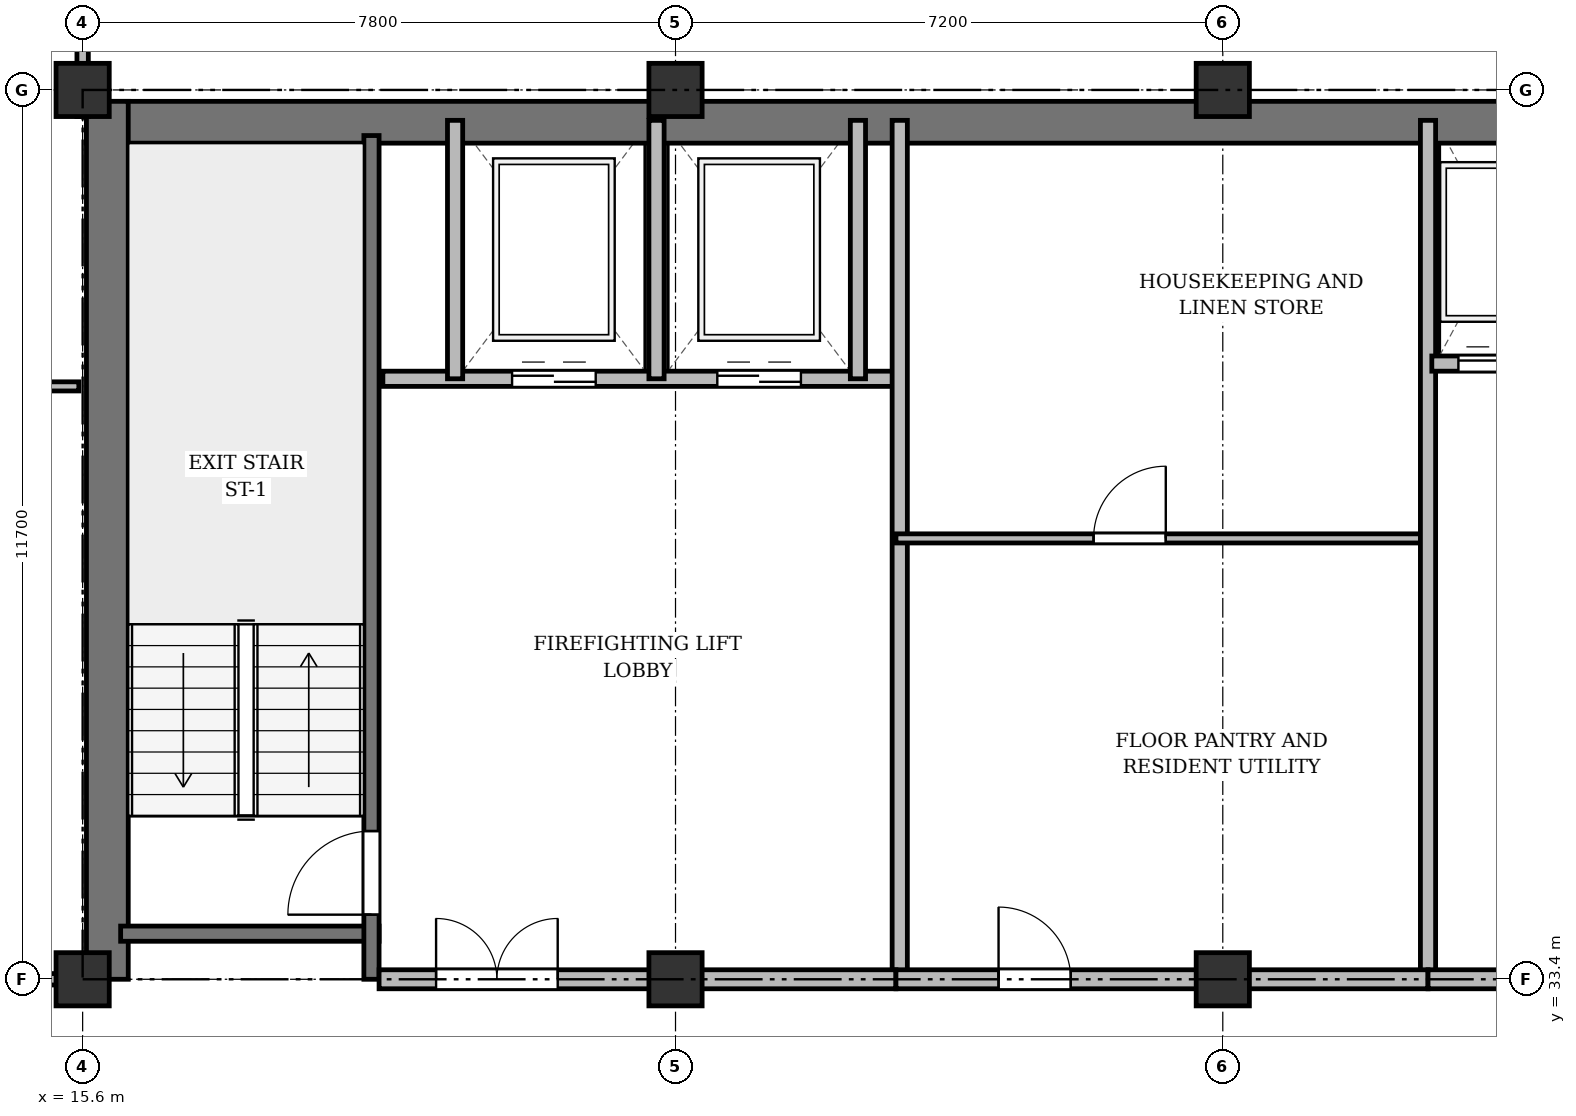
"""IFC4 building model, lengths in metres.
Left out: names, types, materials, properties, quantities, classifications, styles, units other than length and angle.
Written with IfcOpenShell. Run it as: python <this file> out.ifc"""

import sys

from ifc_helpers import new_model, si_unit, direction, frame, frame_2d, origin, origin_2d, place, context, subcontext, project, spatial, rectangle, extrude, source, transform, mapped, element, fill, save


model = new_model("IFC4")
c1 = context("Model", 3, precision=1e-05, world=origin(), true_north=direction((0.0, 1.0)))
c2 = subcontext(c1, "Body", "Model", "MODEL_VIEW")
j1 = project(units=[si_unit("LENGTHUNIT", "METRE"), si_unit("PLANEANGLEUNIT", "RADIAN")], contexts=[c1])
p1 = place(None, origin())
s1 = spatial("IfcSite", under=j1, at=p1, CompositionType="ELEMENT")
p2 = place(p1, origin())
s2 = spatial("IfcBuilding", under=s1, at=p2, CompositionType="ELEMENT")
p3 = place(p2, frame((0.0, 0.0, 215.7)))
s3 = spatial("IfcBuildingStorey", under=s2, at=p3, CompositionType="ELEMENT", Elevation=215.7)
m1 = source(origin(), c2, "Body", "SweptSolid", [
    extrude(rectangle(XDim=0.7, YDim=0.7, at=origin_2d()), origin(), (0.0, 0.0, 1.0), 3.6),
])
for number, where, z_axis, x_axis in (
    (1, (15.6, 33.4, 0.0), (0.0, 0.0, 1.0), (1.0, 0.0, 0.0)),
    (2, (15.6, 45.1, 0.0), (0.0, 0.0, 1.0), (1.0, 0.0, 0.0)),
    (3, (23.4, 33.4, 0.0), (0.0, 0.0, 1.0), (1.0, 0.0, 0.0)),
    (4, (23.4, 45.1, 0.0), (0.0, 0.0, 1.0), (1.0, 0.0, 0.0)),
    (5, (30.6, 33.4, 0.0), (0.0, 0.0, 1.0), (1.0, 0.0, 0.0)),
    (6, (30.6, 45.1, 0.0), (0.0, 0.0, 1.0), (1.0, 0.0, 0.0)),
):
    element("IfcColumn", number, at=place(p3, frame(where, z_axis=z_axis, x_axis=x_axis)), inside=s3, PredefinedType="COLUMN", context=c2, shape_type="MappedRepresentation", body=[
        mapped(m1, transform((0.0, 0.0, 0.0), x_axis=(1.0, 0.0, 0.0), y_axis=(0.0, 1.0, 0.0), z_axis=(0.0, 0.0, 1.0), scale=1.0)),
    ])
p4 = place(p3, frame((15.65, 44.675, 0.0), z_axis=(0.0, 0.0, 1.0), x_axis=(1.0, 0.0, 0.0)))
e7 = element("IfcWall", 7, at=p4, inside=s3, PredefinedType="SHEAR", context=c2, shape_type="SweptSolid", body=[
    extrude(rectangle(XDim=43.1, YDim=0.55, at=frame_2d((21.55, 0.0))), origin(), (0.0, 0.0, 1.0), 3.36),
])
p5 = place(p3, frame((15.925, 33.4, 0.0), z_axis=(0.0, 0.0, 1.0), x_axis=(0.0, 1.0, 0.0)))
e8 = element("IfcWall", 8, at=p5, inside=s3, PredefinedType="SHEAR", context=c2, shape_type="SweptSolid", body=[
    extrude(rectangle(XDim=11.55, YDim=0.55, at=frame_2d((5.775, 0.0))), origin(), (0.0, 0.0, 1.0), 3.36),
])
p6 = place(p3, frame((16.1, 34.0, 0.0), z_axis=(0.0, 0.0, 1.0), x_axis=(1.0, 0.0, 0.0)))
e9 = element("IfcWall", 9, at=p6, inside=s3, PredefinedType="SHEAR", context=c2, shape_type="SweptSolid", body=[
    extrude(rectangle(XDim=3.4, YDim=0.2, at=frame_2d((1.7, 0.0))), origin(), (0.0, 0.0, 1.0), 3.36),
])
p7 = place(p3, frame((19.4, 33.4, 0.0), z_axis=(0.0, 0.0, 1.0), x_axis=(0.0, 1.0, 0.0)))
e10 = element("IfcWall", 10, at=p7, inside=s3, PredefinedType="SHEAR", context=c2, shape_type="SweptSolid", body=[
    extrude(rectangle(XDim=11.1, YDim=0.2, at=frame_2d((5.55, 0.0))), origin(), (0.0, 0.0, 1.0), 3.36),
])
p8 = place(p7, frame((0.85, 0.0, 0.0)))
e11 = element("IfcOpeningElement", 11, at=p8, cuts=e10, PredefinedType="OPENING", context=c2, shape_type="SweptSolid", body=[
    extrude(rectangle(XDim=1.1, YDim=2.15, at=frame_2d((0.55, 1.075))), frame((0.0, 0.11, 0.0), z_axis=(0.0, -1.0, 0.0), x_axis=(1.0, 0.0, 0.0)), (0.0, 0.0, 1.0), 0.22),
])
p9 = place(p3, frame((19.55, 41.3, 0.0), z_axis=(0.0, 0.0, 1.0), x_axis=(1.0, 0.0, 0.0)))
e12 = element("IfcWall", 12, at=p9, inside=s3, PredefinedType="SOLIDWALL", context=c2, shape_type="SweptSolid", body=[
    extrude(rectangle(XDim=6.75, YDim=0.2, at=frame_2d((3.375, 0.0))), origin(), (0.0, 0.0, 1.0), 3.36),
])
p10 = place(p9, frame((1.7, 0.0, 0.0)))
e13 = element("IfcOpeningElement", 13, at=p10, cuts=e12, PredefinedType="OPENING", context=c2, shape_type="SweptSolid", body=[
    extrude(rectangle(XDim=1.1, YDim=2.15, at=frame_2d((0.55, 1.075))), frame((0.0, 0.11, 0.0), z_axis=(0.0, -1.0, 0.0), x_axis=(1.0, 0.0, 0.0)), (0.0, 0.0, 1.0), 0.22),
])
p11 = place(p9, frame((4.4, 0.0, 0.0)))
e14 = element("IfcOpeningElement", 14, at=p11, cuts=e12, PredefinedType="OPENING", context=c2, shape_type="SweptSolid", body=[
    extrude(rectangle(XDim=1.1, YDim=2.15, at=frame_2d((0.55, 1.075))), frame((0.0, 0.11, 0.0), z_axis=(0.0, -1.0, 0.0), x_axis=(1.0, 0.0, 0.0)), (0.0, 0.0, 1.0), 0.22),
])
for number, where, z_axis, x_axis in (
    (15, (20.5, 41.3, 0.0), (0.0, 0.0, 1.0), (0.0, 1.0, 0.0)),
    (16, (23.15, 41.3, 0.0), (0.0, 0.0, 1.0), (0.0, 1.0, 0.0)),
    (17, (25.8, 41.3, 0.0), (0.0, 0.0, 1.0), (0.0, 1.0, 0.0)),
):
    element("IfcWall", number, at=place(p3, frame(where, z_axis=z_axis, x_axis=x_axis)), inside=s3, PredefinedType="SOLIDWALL", context=c2, shape_type="SweptSolid", body=[
        extrude(rectangle(XDim=3.4, YDim=0.2, at=frame_2d((1.7, 0.0))), origin(), (0.0, 0.0, 1.0), 3.36),
    ])
p12 = place(p3, frame((26.35, 33.4, 0.0), z_axis=(0.0, 0.0, 1.0), x_axis=(0.0, 1.0, 0.0)))
e18 = element("IfcWall", 18, at=p12, inside=s3, PredefinedType="SOLIDWALL", context=c2, shape_type="SweptSolid", body=[
    extrude(rectangle(XDim=11.3, YDim=0.2, at=frame_2d((5.65, 0.0))), origin(), (0.0, 0.0, 1.0), 2.91),
])
p13 = place(p3, frame((19.5, 33.4, 0.0), z_axis=(0.0, 0.0, 1.0), x_axis=(1.0, 0.0, 0.0)))
e19 = element("IfcWall", 19, at=p13, inside=s3, PredefinedType="PARTITIONING", context=c2, shape_type="SweptSolid", body=[
    extrude(rectangle(XDim=6.8, YDim=0.25, at=frame_2d((3.4, 0.0))), origin(), (0.0, 0.0, 1.0), 2.91),
])
p14 = place(p13, frame((0.75, 0.0, 0.0)))
e20 = element("IfcOpeningElement", 20, at=p14, cuts=e19, PredefinedType="OPENING", context=c2, shape_type="SweptSolid", body=[
    extrude(rectangle(XDim=1.6, YDim=2.2, at=frame_2d((0.8, 1.1))), frame((0.0, 0.135, 0.0), z_axis=(0.0, -1.0, 0.0), x_axis=(1.0, 0.0, 0.0)), (0.0, 0.0, 1.0), 0.27),
])
p15 = place(p3, frame((26.3, 39.2, 0.0), z_axis=(0.0, 0.0, 1.0), x_axis=(1.0, 0.0, 0.0)))
e21 = element("IfcWall", 21, at=p15, inside=s3, PredefinedType="PARTITIONING", context=c2, shape_type="SweptSolid", body=[
    extrude(rectangle(XDim=7.0, YDim=0.12, at=frame_2d((3.5, 0.0))), origin(), (0.0, 0.0, 1.0), 2.86),
])
p16 = place(p15, frame((2.6, 0.0, 0.0)))
e22 = element("IfcOpeningElement", 22, at=p16, cuts=e21, PredefinedType="OPENING", context=c2, shape_type="SweptSolid", body=[
    extrude(rectangle(XDim=0.95, YDim=2.15, at=frame_2d((0.475, 1.075))), frame((0.0, 0.07, 0.0), z_axis=(0.0, -1.0, 0.0), x_axis=(1.0, 0.0, 0.0)), (0.0, 0.0, 1.0), 0.14),
])
p17 = place(p3, frame((33.3, 33.4, 0.0), z_axis=(0.0, 0.0, 1.0), x_axis=(0.0, 1.0, 0.0)))
e23 = element("IfcWall", 23, at=p17, inside=s3, PredefinedType="SOLIDWALL", context=c2, shape_type="SweptSolid", body=[
    extrude(rectangle(XDim=11.3, YDim=0.2, at=frame_2d((5.65, 0.0))), origin(), (0.0, 0.0, 1.0), 2.91),
])
p18 = place(p3, frame((33.35, 41.5, 0.0), z_axis=(0.0, 0.0, 1.0), x_axis=(1.0, 0.0, 0.0)))
e24 = element("IfcWall", 24, at=p18, inside=s3, PredefinedType="SOLIDWALL", context=c2, shape_type="SweptSolid", body=[
    extrude(rectangle(XDim=6.9, YDim=0.2, at=frame_2d((3.45, 0.0))), origin(), (0.0, 0.0, 1.0), 3.36),
])
p19 = place(p18, frame((0.35, 0.0, 0.0)))
e25 = element("IfcOpeningElement", 25, at=p19, cuts=e24, PredefinedType="OPENING", context=c2, shape_type="SweptSolid", body=[
    extrude(rectangle(XDim=1.05, YDim=2.15, at=frame_2d((0.525, 1.075))), frame((0.0, 0.11, 0.0), z_axis=(0.0, -1.0, 0.0), x_axis=(1.0, 0.0, 0.0)), (0.0, 0.0, 1.0), 0.22),
])
p20 = place(p18, frame((2.05, 0.0, 0.0)))
e26 = element("IfcOpeningElement", 26, at=p20, cuts=e24, PredefinedType="OPENING", context=c2, shape_type="SweptSolid", body=[
    extrude(rectangle(XDim=1.05, YDim=2.15, at=frame_2d((0.525, 1.075))), frame((0.0, 0.11, 0.0), z_axis=(0.0, -1.0, 0.0), x_axis=(1.0, 0.0, 0.0)), (0.0, 0.0, 1.0), 0.22),
])
p21 = place(p18, frame((3.75, 0.0, 0.0)))
e27 = element("IfcOpeningElement", 27, at=p21, cuts=e24, PredefinedType="OPENING", context=c2, shape_type="SweptSolid", body=[
    extrude(rectangle(XDim=1.05, YDim=2.15, at=frame_2d((0.525, 1.075))), frame((0.0, 0.11, 0.0), z_axis=(0.0, -1.0, 0.0), x_axis=(1.0, 0.0, 0.0)), (0.0, 0.0, 1.0), 0.22),
])
p22 = place(p18, frame((5.45, 0.0, 0.0)))
e28 = element("IfcOpeningElement", 28, at=p22, cuts=e24, PredefinedType="OPENING", context=c2, shape_type="SweptSolid", body=[
    extrude(rectangle(XDim=1.05, YDim=2.15, at=frame_2d((0.525, 1.075))), frame((0.0, 0.11, 0.0), z_axis=(0.0, -1.0, 0.0), x_axis=(1.0, 0.0, 0.0)), (0.0, 0.0, 1.0), 0.22),
])
p23 = place(p3, frame((26.3, 33.4, 0.0), z_axis=(0.0, 0.0, 1.0), x_axis=(1.0, 0.0, 0.0)))
e29 = element("IfcWall", 29, at=p23, inside=s3, PredefinedType="PARTITIONING", context=c2, shape_type="SweptSolid", body=[
    extrude(rectangle(XDim=7.0, YDim=0.25, at=frame_2d((3.5, 0.0))), origin(), (0.0, 0.0, 1.0), 2.91),
])
p24 = place(p23, frame((1.35, 0.0, 0.0)))
e30 = element("IfcOpeningElement", 30, at=p24, cuts=e29, PredefinedType="OPENING", context=c2, shape_type="SweptSolid", body=[
    extrude(rectangle(XDim=0.95, YDim=2.15, at=frame_2d((0.475, 1.075))), frame((0.0, 0.135, 0.0), z_axis=(0.0, -1.0, 0.0), x_axis=(1.0, 0.0, 0.0)), (0.0, 0.0, 1.0), 0.27),
])
p25 = place(p3, frame((33.3, 33.4, 0.0), z_axis=(0.0, 0.0, 1.0), x_axis=(1.0, 0.0, 0.0)))
e31 = element("IfcWall", 31, at=p25, inside=s3, PredefinedType="PARTITIONING", context=c2, shape_type="SweptSolid", body=[
    extrude(rectangle(XDim=13.85, YDim=0.25, at=frame_2d((6.925, 0.0))), origin(), (0.0, 0.0, 1.0), 2.91),
])
p26 = place(p25, frame((4.2, 0.0, 0.0)))
e32 = element("IfcOpeningElement", 32, at=p26, cuts=e31, PredefinedType="OPENING", context=c2, shape_type="SweptSolid", body=[
    extrude(rectangle(XDim=1.6, YDim=2.2, at=frame_2d((0.8, 1.1))), frame((0.0, 0.135, 0.0), z_axis=(0.0, -1.0, 0.0), x_axis=(1.0, 0.0, 0.0)), (0.0, 0.0, 1.0), 0.27),
])
p27 = place(p3, frame((8.3, 41.2, 0.0), z_axis=(0.0, 0.0, 1.0), x_axis=(1.0, 0.0, 0.0)))
e33 = element("IfcWall", 33, at=p27, inside=s3, PredefinedType="PARTITIONING", context=c2, shape_type="SweptSolid", body=[
    extrude(rectangle(XDim=7.25, YDim=0.12, at=frame_2d((3.625, 0.0))), origin(), (0.0, 0.0, 1.0), 2.86),
])
p28 = place(p27, frame((3.15, 0.0, 0.0)))
e34 = element("IfcOpeningElement", 34, at=p28, cuts=e33, PredefinedType="OPENING", context=c2, shape_type="SweptSolid", body=[
    extrude(rectangle(XDim=0.95, YDim=2.15, at=frame_2d((0.475, 1.075))), frame((0.0, 0.07, 0.0), z_axis=(0.0, -1.0, 0.0), x_axis=(1.0, 0.0, 0.0)), (0.0, 0.0, 1.0), 0.14),
])
p29 = place(p3, frame((8.25, 33.4, 0.0), z_axis=(0.0, 0.0, 1.0), x_axis=(1.0, 0.0, 0.0)))
e35 = element("IfcWall", 35, at=p29, inside=s3, PredefinedType="PARTITIONING", context=c2, shape_type="SweptSolid", body=[
    extrude(rectangle(XDim=7.35, YDim=0.15, at=frame_2d((3.675, 0.0))), origin(), (0.0, 0.0, 1.0), 2.91),
])
p30 = place(p29, frame((3.192, 0.0, 0.0)))
e36 = element("IfcOpeningElement", 36, at=p30, cuts=e35, PredefinedType="OPENING", context=c2, shape_type="SweptSolid", body=[
    extrude(rectangle(XDim=0.95, YDim=2.15, at=frame_2d((0.475, 1.075))), frame((0.0, 0.085, 0.0), z_axis=(0.0, -1.0, 0.0), x_axis=(1.0, 0.0, 0.0)), (0.0, 0.0, 1.0), 0.17),
])
p31 = place(p3, frame((15.6, 44.75, 0.0), z_axis=(0.0, 0.0, 1.0), x_axis=(0.0, 1.0, 0.0)))
e37 = element("IfcWall", 37, at=p31, inside=s3, PredefinedType="PARTITIONING", context=c2, shape_type="SweptSolid", body=[
    extrude(rectangle(XDim=3.61, YDim=0.15, at=frame_2d((1.805, 0.0))), origin(), (0.0, 0.0, 1.0), 2.86),
])
p32 = place(p31, frame((1.1, 0.0, 0.0)))
e38 = element("IfcOpeningElement", 38, at=p32, cuts=e37, PredefinedType="OPENING", context=c2, shape_type="SweptSolid", body=[
    extrude(rectangle(XDim=0.95, YDim=2.15, at=frame_2d((0.475, 1.075))), frame((0.0, 0.085, 0.0), z_axis=(0.0, -1.0, 0.0), x_axis=(1.0, 0.0, 0.0)), (0.0, 0.0, 1.0), 0.17),
])
m2 = source(origin(), c2, "Body", "SweptSolid", [
    extrude(rectangle(XDim=1.1, YDim=2.15, at=frame_2d((0.55, 1.075))), frame((0.0, 0.025, 0.0), z_axis=(0.0, -1.0, 0.0), x_axis=(1.0, 0.0, 0.0)), (0.0, 0.0, 1.0), 0.05),
])
p33 = place(p8, origin())
e39 = element("IfcDoor", 39, at=p33, inside=s3, OperationType="SINGLE_SWING_LEFT", PredefinedType="DOOR", context=c2, shape_type="MappedRepresentation", body=[
    mapped(m2, transform((0.0, 0.0, 0.0), x_axis=(1.0, 0.0, 0.0), y_axis=(0.0, 1.0, 0.0), z_axis=(0.0, 0.0, 1.0), scale=1.0)),
])
fill(e11, e39)
p34 = place(p10, origin())
e40 = element("IfcDoor", 40, at=p34, inside=s3, OperationType="DOUBLE_DOOR_SLIDING", PredefinedType="DOOR", context=c2, shape_type="MappedRepresentation", body=[
    mapped(m2, transform((0.0, 0.0, 0.0), x_axis=(1.0, 0.0, 0.0), y_axis=(0.0, 1.0, 0.0), z_axis=(0.0, 0.0, 1.0), scale=1.0)),
])
fill(e13, e40)
p35 = place(p11, origin())
e41 = element("IfcDoor", 41, at=p35, inside=s3, OperationType="DOUBLE_DOOR_SLIDING", PredefinedType="DOOR", context=c2, shape_type="MappedRepresentation", body=[
    mapped(m2, transform((0.0, 0.0, 0.0), x_axis=(1.0, 0.0, 0.0), y_axis=(0.0, 1.0, 0.0), z_axis=(0.0, 0.0, 1.0), scale=1.0)),
])
fill(e14, e41)
m3 = source(origin(), c2, "Body", "SweptSolid", [
    extrude(rectangle(XDim=1.6, YDim=2.2, at=frame_2d((0.8, 1.1))), frame((0.0, 0.025, 0.0), z_axis=(0.0, -1.0, 0.0), x_axis=(1.0, 0.0, 0.0)), (0.0, 0.0, 1.0), 0.05),
])
p36 = place(p14, origin())
e42 = element("IfcDoor", 42, at=p36, inside=s3, OperationType="DOUBLE_DOOR_SINGLE_SWING", PredefinedType="DOOR", context=c2, shape_type="MappedRepresentation", body=[
    mapped(m3, transform((0.0, 0.0, 0.0), x_axis=(1.0, 0.0, 0.0), y_axis=(0.0, 1.0, 0.0), z_axis=(0.0, 0.0, 1.0), scale=1.0)),
])
fill(e20, e42)
m4 = source(origin(), c2, "Body", "SweptSolid", [
    extrude(rectangle(XDim=0.95, YDim=2.15, at=frame_2d((0.475, 1.075))), frame((0.0, 0.025, 0.0), z_axis=(0.0, -1.0, 0.0), x_axis=(1.0, 0.0, 0.0)), (0.0, 0.0, 1.0), 0.05),
])
p37 = place(p16, origin())
e43 = element("IfcDoor", 43, at=p37, inside=s3, OperationType="SINGLE_SWING_RIGHT", PredefinedType="DOOR", context=c2, shape_type="MappedRepresentation", body=[
    mapped(m4, transform((0.0, 0.0, 0.0), x_axis=(1.0, 0.0, 0.0), y_axis=(0.0, 1.0, 0.0), z_axis=(0.0, 0.0, 1.0), scale=1.0)),
])
fill(e22, e43)
m5 = source(origin(), c2, "Body", "SweptSolid", [
    extrude(rectangle(XDim=1.05, YDim=2.15, at=frame_2d((0.525, 1.075))), frame((0.0, 0.025, 0.0), z_axis=(0.0, -1.0, 0.0), x_axis=(1.0, 0.0, 0.0)), (0.0, 0.0, 1.0), 0.05),
])
p38 = place(p19, origin())
e44 = element("IfcDoor", 44, at=p38, inside=s3, OperationType="DOUBLE_DOOR_SLIDING", PredefinedType="DOOR", context=c2, shape_type="MappedRepresentation", body=[
    mapped(m5, transform((0.0, 0.0, 0.0), x_axis=(1.0, 0.0, 0.0), y_axis=(0.0, 1.0, 0.0), z_axis=(0.0, 0.0, 1.0), scale=1.0)),
])
fill(e25, e44)
p39 = place(p24, origin())
e45 = element("IfcDoor", 45, at=p39, inside=s3, OperationType="SINGLE_SWING_LEFT", PredefinedType="DOOR", context=c2, shape_type="MappedRepresentation", body=[
    mapped(m4, transform((0.0, 0.0, 0.0), x_axis=(1.0, 0.0, 0.0), y_axis=(0.0, 1.0, 0.0), z_axis=(0.0, 0.0, 1.0), scale=1.0)),
])
fill(e30, e45)
save(model, sys.argv[1])
